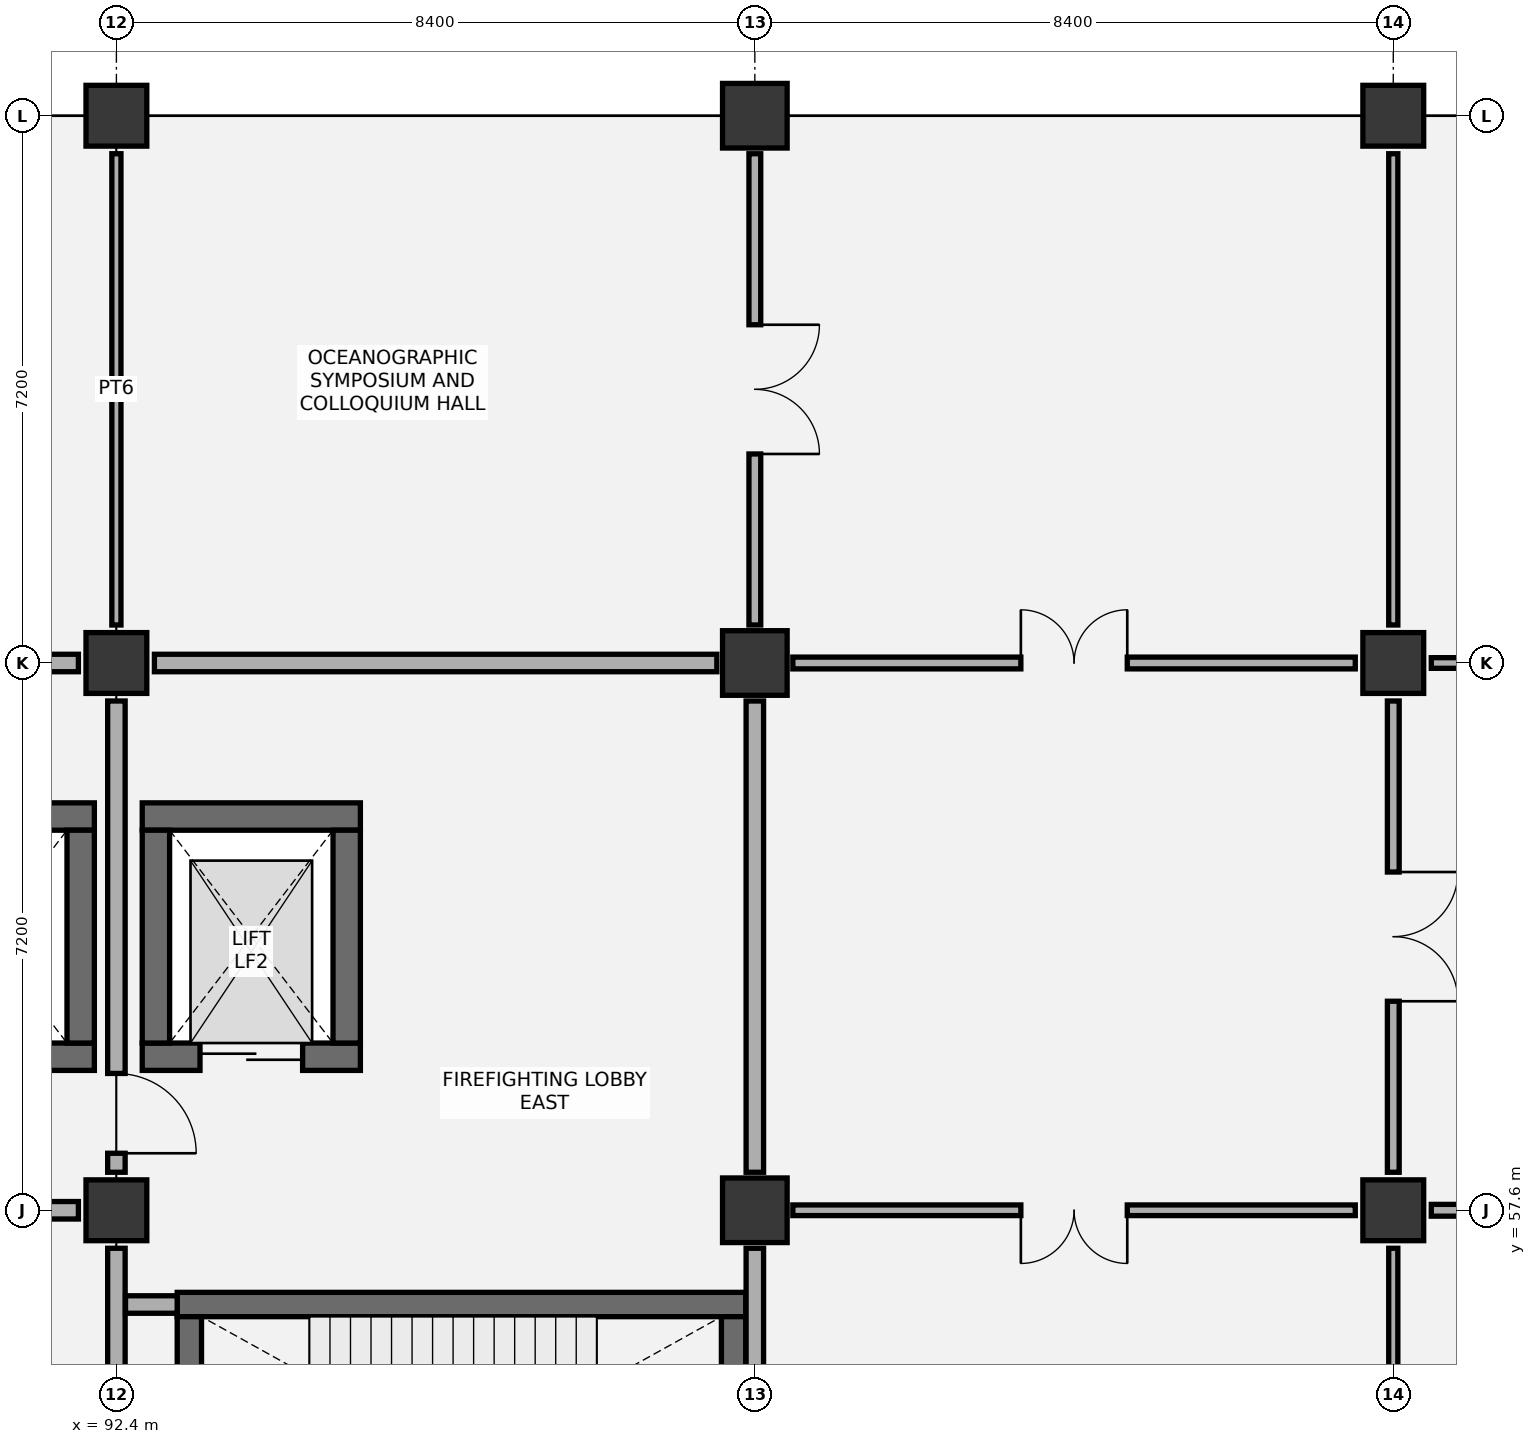
"""IFC4 building model, lengths in metres.
Left out: names, types, materials, properties, quantities, classifications, styles, units other than length and angle.
Written with IfcOpenShell. Run it as: python <this file> out.ifc"""

import sys

from ifc_helpers import new_model, si_unit, direction, frame, frame_2d, origin, origin_2d, place, context, subcontext, project, spatial, rectangle, extrude, element, fill, save


model = new_model("IFC4")
c1 = context("Model", 3, precision=1e-05, world=origin(), true_north=direction((0.0, 1.0)))
c2 = subcontext(c1, "Body", "Model", "MODEL_VIEW")
j1 = project(units=[si_unit("LENGTHUNIT", "METRE"), si_unit("PLANEANGLEUNIT", "RADIAN")], contexts=[c1])
p1 = place(None, origin())
s1 = spatial("IfcSite", under=j1, at=p1, CompositionType="ELEMENT")
p2 = place(p1, origin())
s2 = spatial("IfcBuilding", under=s1, at=p2, CompositionType="ELEMENT")
p3 = place(p2, frame((0.0, 0.0, 22.2)))
s3 = spatial("IfcBuildingStorey", under=s2, at=p3, CompositionType="ELEMENT", Elevation=22.2)
for number, where, z_axis, x_axis in (
    (1, (92.4, 57.6, 0.0), (0.0, 0.0, 1.0), (1.0, 0.0, 0.0)),
    (2, (92.4, 64.8, 0.0), (0.0, 0.0, 1.0), (1.0, 0.0, 0.0)),
    (3, (92.4, 72.0, 0.0), (0.0, 0.0, 1.0), (1.0, 0.0, 0.0)),
):
    element("IfcColumn", number, at=place(p3, frame(where, z_axis=z_axis, x_axis=x_axis)), inside=s3, PredefinedType="COLUMN", context=c2, shape_type="SweptSolid", body=[
        extrude(rectangle(XDim=0.8, YDim=0.8, at=origin_2d()), origin(), (0.0, 0.0, 1.0), 4.8),
    ])
for number, where, z_axis, x_axis in (
    (4, (100.8, 57.6, 0.0), (0.0, 0.0, 1.0), (1.0, 0.0, 0.0)),
    (5, (100.8, 64.8, 0.0), (0.0, 0.0, 1.0), (1.0, 0.0, 0.0)),
    (6, (100.8, 72.0, 0.0), (0.0, 0.0, 1.0), (1.0, 0.0, 0.0)),
):
    element("IfcColumn", number, at=place(p3, frame(where, z_axis=z_axis, x_axis=x_axis)), inside=s3, PredefinedType="COLUMN", context=c2, shape_type="SweptSolid", body=[
        extrude(rectangle(XDim=0.85, YDim=0.85, at=origin_2d()), origin(), (0.0, 0.0, 1.0), 4.8),
    ])
for number, where, z_axis, x_axis in (
    (7, (109.2, 57.6, 0.0), (0.0, 0.0, 1.0), (1.0, 0.0, 0.0)),
    (8, (109.2, 64.8, 0.0), (0.0, 0.0, 1.0), (1.0, 0.0, 0.0)),
    (9, (109.2, 72.0, 0.0), (0.0, 0.0, 1.0), (1.0, 0.0, 0.0)),
):
    element("IfcColumn", number, at=place(p3, frame(where, z_axis=z_axis, x_axis=x_axis)), inside=s3, PredefinedType="COLUMN", context=c2, shape_type="SweptSolid", body=[
        extrude(rectangle(XDim=0.8, YDim=0.8, at=origin_2d()), origin(), (0.0, 0.0, 1.0), 4.8),
    ])
p4 = place(p3, frame((93.2, 56.36, 0.0), z_axis=(0.0, 0.0, 1.0), x_axis=(1.0, 0.0, 0.0)))
e10 = element("IfcWall", 10, at=p4, inside=s3, PredefinedType="SHEAR", context=c2, shape_type="SweptSolid", body=[
    extrude(rectangle(XDim=7.48, YDim=0.32, at=frame_2d((3.74, 0.0))), origin(), (0.0, 0.0, 1.0), 4.52),
])
for number, where, z_axis, x_axis in (
    (11, (93.36, 52.4, 0.0), (0.0, 0.0, 1.0), (0.0, 1.0, 0.0)),
    (12, (100.52, 52.4, 0.0), (0.0, 0.0, 1.0), (0.0, 1.0, 0.0)),
):
    element("IfcWall", number, at=place(p3, frame(where, z_axis=z_axis, x_axis=x_axis)), inside=s3, PredefinedType="SHEAR", context=c2, shape_type="SweptSolid", body=[
        extrude(rectangle(XDim=3.8, YDim=0.32, at=frame_2d((1.9, 0.0))), origin(), (0.0, 0.0, 1.0), 4.52),
    ])
p5 = place(p3, frame((84.34, 62.78, 0.0), z_axis=(0.0, 0.0, 1.0), x_axis=(1.0, 0.0, 0.0)))
e13 = element("IfcWall", 13, at=p5, inside=s3, PredefinedType="SHEAR", context=c2, shape_type="SweptSolid", body=[
    extrude(rectangle(XDim=7.77, YDim=0.36, at=frame_2d((3.885, 0.0))), origin(), (0.0, 0.0, 1.0), 4.52),
])
p6 = place(p3, frame((89.45, 59.62, 0.0), z_axis=(0.0, 0.0, 1.0), x_axis=(1.0, 0.0, 0.0)))
e14 = element("IfcWall", 14, at=p6, inside=s3, PredefinedType="SHEAR", context=c2, shape_type="SweptSolid", body=[
    extrude(rectangle(XDim=2.66, YDim=0.36, at=frame_2d((1.33, 0.0))), origin(), (0.0, 0.0, 1.0), 4.52),
])
p7 = place(p6, frame((0.78, 0.0, 0.0)))
e15 = element("IfcOpeningElement", 15, at=p7, cuts=e14, PredefinedType="OPENING", context=c2, shape_type="SweptSolid", body=[
    extrude(rectangle(XDim=1.1, YDim=2.15, at=frame_2d((0.55, 1.075))), frame((0.0, 0.19, 0.0), z_axis=(0.0, -1.0, 0.0), x_axis=(1.0, 0.0, 0.0)), (0.0, 0.0, 1.0), 0.38),
])
p8 = place(p3, frame((91.93, 59.8, 0.0), z_axis=(0.0, 0.0, 1.0), x_axis=(0.0, 1.0, 0.0)))
e16 = element("IfcWall", 16, at=p8, inside=s3, PredefinedType="SHEAR", context=c2, shape_type="SweptSolid", body=[
    extrude(rectangle(XDim=2.8, YDim=0.36, at=frame_2d((1.4, 0.0))), origin(), (0.0, 0.0, 1.0), 4.52),
])
p9 = place(p3, frame((92.74, 62.78, 0.0), z_axis=(0.0, 0.0, 1.0), x_axis=(1.0, 0.0, 0.0)))
e17 = element("IfcWall", 17, at=p9, inside=s3, PredefinedType="SHEAR", context=c2, shape_type="SweptSolid", body=[
    extrude(rectangle(XDim=2.87, YDim=0.36, at=frame_2d((1.435, 0.0))), origin(), (0.0, 0.0, 1.0), 4.52),
])
p10 = place(p3, frame((92.74, 59.62, 0.0), z_axis=(0.0, 0.0, 1.0), x_axis=(1.0, 0.0, 0.0)))
e18 = element("IfcWall", 18, at=p10, inside=s3, PredefinedType="SHEAR", context=c2, shape_type="SweptSolid", body=[
    extrude(rectangle(XDim=2.87, YDim=0.36, at=frame_2d((1.435, 0.0))), origin(), (0.0, 0.0, 1.0), 4.52),
])
p11 = place(p10, frame((0.76, 0.0, 0.0)))
e19 = element("IfcOpeningElement", 19, at=p11, cuts=e18, PredefinedType="OPENING", context=c2, shape_type="SweptSolid", body=[
    extrude(rectangle(XDim=1.35, YDim=2.2, at=frame_2d((0.675, 1.1))), frame((0.0, 0.19, 0.0), z_axis=(0.0, -1.0, 0.0), x_axis=(1.0, 0.0, 0.0)), (0.0, 0.0, 1.0), 0.38),
])
for number, where, z_axis, x_axis in (
    (20, (92.92, 59.8, 0.0), (0.0, 0.0, 1.0), (0.0, 1.0, 0.0)),
    (21, (95.43, 59.8, 0.0), (0.0, 0.0, 1.0), (0.0, 1.0, 0.0)),
):
    element("IfcWall", number, at=place(p3, frame(where, z_axis=z_axis, x_axis=x_axis)), inside=s3, PredefinedType="SHEAR", context=c2, shape_type="SweptSolid", body=[
        extrude(rectangle(XDim=2.8, YDim=0.36, at=frame_2d((1.4, 0.0))), origin(), (0.0, 0.0, 1.0), 4.52),
    ])
p12 = place(p3, frame((92.4, 50.9, 0.0), z_axis=(0.0, 0.0, 1.0), x_axis=(0.0, 1.0, 0.0)))
e22 = element("IfcWall", 22, at=p12, inside=s3, PredefinedType="PARTITIONING", context=c2, shape_type="SweptSolid", body=[
    extrude(rectangle(XDim=6.2, YDim=0.23, at=frame_2d((3.1, 0.0))), origin(), (0.0, 0.0, 1.0), 4.015),
])
p13 = place(p12, frame((0.05, 0.0, 0.0)))
e23 = element("IfcOpeningElement", 23, at=p13, cuts=e22, PredefinedType="OPENING", context=c2, shape_type="SweptSolid", body=[
    extrude(rectangle(XDim=1.05, YDim=2.15, at=frame_2d((0.525, 1.075))), frame((0.0, 0.125, 0.0), z_axis=(0.0, -1.0, 0.0), x_axis=(1.0, 0.0, 0.0)), (0.0, 0.0, 1.0), 0.25),
])
p14 = place(p3, frame((84.5, 57.6, 0.0), z_axis=(0.0, 0.0, 1.0), x_axis=(1.0, 0.0, 0.0)))
e24 = element("IfcWall", 24, at=p14, inside=s3, PredefinedType="PARTITIONING", context=c2, shape_type="SweptSolid", body=[
    extrude(rectangle(XDim=7.4, YDim=0.23, at=frame_2d((3.7, 0.0))), origin(), (0.0, 0.0, 1.0), 3.815),
])
p15 = place(p14, frame((2.95, 0.0, 0.0)))
e25 = element("IfcOpeningElement", 25, at=p15, cuts=e24, PredefinedType="OPENING", context=c2, shape_type="SweptSolid", body=[
    extrude(rectangle(XDim=1.5, YDim=2.15, at=frame_2d((0.75, 1.075))), frame((0.0, 0.125, 0.0), z_axis=(0.0, -1.0, 0.0), x_axis=(1.0, 0.0, 0.0)), (0.0, 0.0, 1.0), 0.25),
])
p16 = place(p3, frame((92.4, 58.1, 0.0), z_axis=(0.0, 0.0, 1.0), x_axis=(0.0, 1.0, 0.0)))
e26 = element("IfcWall", 26, at=p16, inside=s3, PredefinedType="PARTITIONING", context=c2, shape_type="SweptSolid", body=[
    extrude(rectangle(XDim=6.2, YDim=0.23, at=frame_2d((3.1, 0.0))), origin(), (0.0, 0.0, 1.0), 3.865),
])
p17 = place(p16, frame((0.25, 0.0, 0.0)))
e27 = element("IfcOpeningElement", 27, at=p17, cuts=e26, PredefinedType="OPENING", context=c2, shape_type="SweptSolid", body=[
    extrude(rectangle(XDim=1.05, YDim=2.15, at=frame_2d((0.525, 1.075))), frame((0.0, 0.125, 0.0), z_axis=(0.0, -1.0, 0.0), x_axis=(1.0, 0.0, 0.0)), (0.0, 0.0, 1.0), 0.25),
])
p18 = place(p3, frame((84.5, 64.8, 0.0), z_axis=(0.0, 0.0, 1.0), x_axis=(1.0, 0.0, 0.0)))
e28 = element("IfcWall", 28, at=p18, inside=s3, PredefinedType="PARTITIONING", context=c2, shape_type="SweptSolid", body=[
    extrude(rectangle(XDim=7.4, YDim=0.23, at=frame_2d((3.7, 0.0))), origin(), (0.0, 0.0, 1.0), 3.815),
])
p19 = place(p3, frame((92.4, 65.3, 0.0), z_axis=(0.0, 0.0, 1.0), x_axis=(0.0, 1.0, 0.0)))
e29 = element("IfcWall", 29, at=p19, inside=s3, PredefinedType="PARTITIONING", context=c2, shape_type="SweptSolid", body=[
    extrude(rectangle(XDim=6.2, YDim=0.12, at=frame_2d((3.1, 0.0))), origin(), (0.0, 0.0, 1.0), 4.115),
])
p20 = place(p3, frame((100.8, 50.9, 0.0), z_axis=(0.0, 0.0, 1.0), x_axis=(0.0, 1.0, 0.0)))
e30 = element("IfcWall", 30, at=p20, inside=s3, PredefinedType="PARTITIONING", context=c2, shape_type="SweptSolid", body=[
    extrude(rectangle(XDim=6.2, YDim=0.23, at=frame_2d((3.1, 0.0))), origin(), (0.0, 0.0, 1.0), 3.865),
])
p21 = place(p3, frame((92.52, 56.36, 0.0), z_axis=(0.0, 0.0, 1.0), x_axis=(1.0, 0.0, 0.0)))
e31 = element("IfcWall", 31, at=p21, inside=s3, PredefinedType="PARTITIONING", context=c2, shape_type="SweptSolid", body=[
    extrude(rectangle(XDim=0.68, YDim=0.23, at=frame_2d((0.34, 0.0))), origin(), (0.0, 0.0, 1.0), 4.52),
])
p22 = place(p3, frame((100.8, 58.1, 0.0), z_axis=(0.0, 0.0, 1.0), x_axis=(0.0, 1.0, 0.0)))
e32 = element("IfcWall", 32, at=p22, inside=s3, PredefinedType="PARTITIONING", context=c2, shape_type="SweptSolid", body=[
    extrude(rectangle(XDim=6.2, YDim=0.23, at=frame_2d((3.1, 0.0))), origin(), (0.0, 0.0, 1.0), 4.115),
])
p23 = place(p3, frame((92.9, 64.8, 0.0), z_axis=(0.0, 0.0, 1.0), x_axis=(1.0, 0.0, 0.0)))
e33 = element("IfcWall", 33, at=p23, inside=s3, PredefinedType="PARTITIONING", context=c2, shape_type="SweptSolid", body=[
    extrude(rectangle(XDim=7.4, YDim=0.23, at=frame_2d((3.7, 0.0))), origin(), (0.0, 0.0, 1.0), 3.815),
])
p24 = place(p3, frame((100.8, 65.3, 0.0), z_axis=(0.0, 0.0, 1.0), x_axis=(0.0, 1.0, 0.0)))
e34 = element("IfcWall", 34, at=p24, inside=s3, PredefinedType="PARTITIONING", context=c2, shape_type="SweptSolid", body=[
    extrude(rectangle(XDim=6.2, YDim=0.155, at=frame_2d((3.1, 0.0))), origin(), (0.0, 0.0, 1.0), 3.865),
])
p25 = place(p24, frame((2.25, 0.0, 0.0)))
e35 = element("IfcOpeningElement", 35, at=p25, cuts=e34, PredefinedType="OPENING", context=c2, shape_type="SweptSolid", body=[
    extrude(rectangle(XDim=1.7, YDim=2.25, at=frame_2d((0.85, 1.125))), frame((0.0, 0.087, 0.0), z_axis=(0.0, -1.0, 0.0), x_axis=(1.0, 0.0, 0.0)), (0.0, 0.0, 1.0), 0.175),
])
p26 = place(p3, frame((109.2, 50.9, 0.0), z_axis=(0.0, 0.0, 1.0), x_axis=(0.0, 1.0, 0.0)))
e36 = element("IfcWall", 36, at=p26, inside=s3, PredefinedType="PARTITIONING", context=c2, shape_type="SweptSolid", body=[
    extrude(rectangle(XDim=6.2, YDim=0.12, at=frame_2d((3.1, 0.0))), origin(), (0.0, 0.0, 1.0), 4.115),
])
p27 = place(p3, frame((101.3, 57.6, 0.0), z_axis=(0.0, 0.0, 1.0), x_axis=(1.0, 0.0, 0.0)))
e37 = element("IfcWall", 37, at=p27, inside=s3, PredefinedType="PARTITIONING", context=c2, shape_type="SweptSolid", body=[
    extrude(rectangle(XDim=7.4, YDim=0.14, at=frame_2d((3.7, 0.0))), origin(), (0.0, 0.0, 1.0), 3.815),
])
p28 = place(p27, frame((3.0, 0.0, 0.0)))
e38 = element("IfcOpeningElement", 38, at=p28, cuts=e37, PredefinedType="OPENING", context=c2, shape_type="SweptSolid", body=[
    extrude(rectangle(XDim=1.4, YDim=2.15, at=frame_2d((0.7, 1.075))), frame((0.0, 0.08, 0.0), z_axis=(0.0, -1.0, 0.0), x_axis=(1.0, 0.0, 0.0)), (0.0, 0.0, 1.0), 0.16),
])
p29 = place(p3, frame((109.2, 58.1, 0.0), z_axis=(0.0, 0.0, 1.0), x_axis=(0.0, 1.0, 0.0)))
e39 = element("IfcWall", 39, at=p29, inside=s3, PredefinedType="PARTITIONING", context=c2, shape_type="SweptSolid", body=[
    extrude(rectangle(XDim=6.2, YDim=0.155, at=frame_2d((3.1, 0.0))), origin(), (0.0, 0.0, 1.0), 3.865),
])
p30 = place(p29, frame((2.25, 0.0, 0.0)))
e40 = element("IfcOpeningElement", 40, at=p30, cuts=e39, PredefinedType="OPENING", context=c2, shape_type="SweptSolid", body=[
    extrude(rectangle(XDim=1.7, YDim=2.25, at=frame_2d((0.85, 1.125))), frame((0.0, 0.087, 0.0), z_axis=(0.0, -1.0, 0.0), x_axis=(1.0, 0.0, 0.0)), (0.0, 0.0, 1.0), 0.175),
])
p31 = place(p3, frame((101.3, 64.8, 0.0), z_axis=(0.0, 0.0, 1.0), x_axis=(1.0, 0.0, 0.0)))
e41 = element("IfcWall", 41, at=p31, inside=s3, PredefinedType="PARTITIONING", context=c2, shape_type="SweptSolid", body=[
    extrude(rectangle(XDim=7.4, YDim=0.155, at=frame_2d((3.7, 0.0))), origin(), (0.0, 0.0, 1.0), 3.815),
])
p32 = place(p31, frame((3.0, 0.0, 0.0)))
e42 = element("IfcOpeningElement", 42, at=p32, cuts=e41, PredefinedType="OPENING", context=c2, shape_type="SweptSolid", body=[
    extrude(rectangle(XDim=1.4, YDim=2.15, at=frame_2d((0.7, 1.075))), frame((0.0, 0.087, 0.0), z_axis=(0.0, -1.0, 0.0), x_axis=(1.0, 0.0, 0.0)), (0.0, 0.0, 1.0), 0.175),
])
p33 = place(p3, frame((109.2, 65.3, 0.0), z_axis=(0.0, 0.0, 1.0), x_axis=(0.0, 1.0, 0.0)))
e43 = element("IfcWall", 43, at=p33, inside=s3, PredefinedType="PARTITIONING", context=c2, shape_type="SweptSolid", body=[
    extrude(rectangle(XDim=6.2, YDim=0.12, at=frame_2d((3.1, 0.0))), origin(), (0.0, 0.0, 1.0), 4.225),
])
p34 = place(p3, frame((109.7, 57.6, 0.0), z_axis=(0.0, 0.0, 1.0), x_axis=(1.0, 0.0, 0.0)))
e44 = element("IfcWall", 44, at=p34, inside=s3, PredefinedType="PARTITIONING", context=c2, shape_type="SweptSolid", body=[
    extrude(rectangle(XDim=7.4, YDim=0.155, at=frame_2d((3.7, 0.0))), origin(), (0.0, 0.0, 1.0), 3.815),
])
p35 = place(p34, frame((2.85, 0.0, 0.0)))
e45 = element("IfcOpeningElement", 45, at=p35, cuts=e44, PredefinedType="OPENING", context=c2, shape_type="SweptSolid", body=[
    extrude(rectangle(XDim=1.7, YDim=2.25, at=frame_2d((0.85, 1.125))), frame((0.0, 0.087, 0.0), z_axis=(0.0, -1.0, 0.0), x_axis=(1.0, 0.0, 0.0)), (0.0, 0.0, 1.0), 0.175),
])
p36 = place(p3, frame((109.7, 64.8, 0.0), z_axis=(0.0, 0.0, 1.0), x_axis=(1.0, 0.0, 0.0)))
e46 = element("IfcWall", 46, at=p36, inside=s3, PredefinedType="PARTITIONING", context=c2, shape_type="SweptSolid", body=[
    extrude(rectangle(XDim=7.4, YDim=0.14, at=frame_2d((3.7, 0.0))), origin(), (0.0, 0.0, 1.0), 3.815),
])
p37 = place(p36, frame((3.0, 0.0, 0.0)))
e47 = element("IfcOpeningElement", 47, at=p37, cuts=e46, PredefinedType="OPENING", context=c2, shape_type="SweptSolid", body=[
    extrude(rectangle(XDim=1.4, YDim=2.15, at=frame_2d((0.7, 1.075))), frame((0.0, 0.08, 0.0), z_axis=(0.0, -1.0, 0.0), x_axis=(1.0, 0.0, 0.0)), (0.0, 0.0, 1.0), 0.16),
])
p38 = place(p11, origin())
e48 = element("IfcDoor", 48, at=p38, inside=s3, OperationType="DOUBLE_DOOR_SLIDING", PredefinedType="DOOR", context=c2, shape_type="SweptSolid", body=[
    extrude(rectangle(XDim=1.35, YDim=2.2, at=frame_2d((0.675, 1.1))), frame((0.0, 0.025, 0.0), z_axis=(0.0, -1.0, 0.0), x_axis=(1.0, 0.0, 0.0)), (0.0, 0.0, 1.0), 0.05),
])
fill(e19, e48)
p39 = place(p17, frame((1.05, 0.0, 0.0), z_axis=(0.0, 0.0, 1.0), x_axis=(-1.0, 0.0, 0.0)))
e49 = element("IfcDoor", 49, at=p39, inside=s3, OperationType="SINGLE_SWING_RIGHT", PredefinedType="DOOR", context=c2, shape_type="SweptSolid", body=[
    extrude(rectangle(XDim=1.05, YDim=2.15, at=frame_2d((0.525, 1.075))), frame((0.0, 0.025, 0.0), z_axis=(0.0, -1.0, 0.0), x_axis=(1.0, 0.0, 0.0)), (0.0, 0.0, 1.0), 0.05),
])
fill(e27, e49)
p40 = place(p25, frame((1.7, 0.0, 0.0), z_axis=(0.0, 0.0, 1.0), x_axis=(-1.0, 0.0, 0.0)))
e50 = element("IfcDoor", 50, at=p40, inside=s3, OperationType="DOUBLE_DOOR_SINGLE_SWING", PredefinedType="DOOR", context=c2, shape_type="SweptSolid", body=[
    extrude(rectangle(XDim=1.7, YDim=2.25, at=frame_2d((0.85, 1.125))), frame((0.0, 0.025, 0.0), z_axis=(0.0, -1.0, 0.0), x_axis=(1.0, 0.0, 0.0)), (0.0, 0.0, 1.0), 0.05),
])
fill(e35, e50)
p41 = place(p28, frame((1.4, 0.0, 0.0), z_axis=(0.0, 0.0, 1.0), x_axis=(-1.0, 0.0, 0.0)))
e51 = element("IfcDoor", 51, at=p41, inside=s3, OperationType="DOUBLE_DOOR_SINGLE_SWING", PredefinedType="DOOR", context=c2, shape_type="SweptSolid", body=[
    extrude(rectangle(XDim=1.4, YDim=2.15, at=frame_2d((0.7, 1.075))), frame((0.0, 0.025, 0.0), z_axis=(0.0, -1.0, 0.0), x_axis=(1.0, 0.0, 0.0)), (0.0, 0.0, 1.0), 0.05),
])
fill(e38, e51)
p42 = place(p30, frame((1.7, 0.0, 0.0), z_axis=(0.0, 0.0, 1.0), x_axis=(-1.0, 0.0, 0.0)))
e52 = element("IfcDoor", 52, at=p42, inside=s3, OperationType="DOUBLE_DOOR_SINGLE_SWING", PredefinedType="DOOR", context=c2, shape_type="SweptSolid", body=[
    extrude(rectangle(XDim=1.7, YDim=2.25, at=frame_2d((0.85, 1.125))), frame((0.0, 0.025, 0.0), z_axis=(0.0, -1.0, 0.0), x_axis=(1.0, 0.0, 0.0)), (0.0, 0.0, 1.0), 0.05),
])
fill(e40, e52)
p43 = place(p32, origin())
e53 = element("IfcDoor", 53, at=p43, inside=s3, OperationType="DOUBLE_DOOR_SINGLE_SWING", PredefinedType="DOOR", context=c2, shape_type="SweptSolid", body=[
    extrude(rectangle(XDim=1.4, YDim=2.15, at=frame_2d((0.7, 1.075))), frame((0.0, 0.025, 0.0), z_axis=(0.0, -1.0, 0.0), x_axis=(1.0, 0.0, 0.0)), (0.0, 0.0, 1.0), 0.05),
])
fill(e42, e53)
save(model, sys.argv[1])
